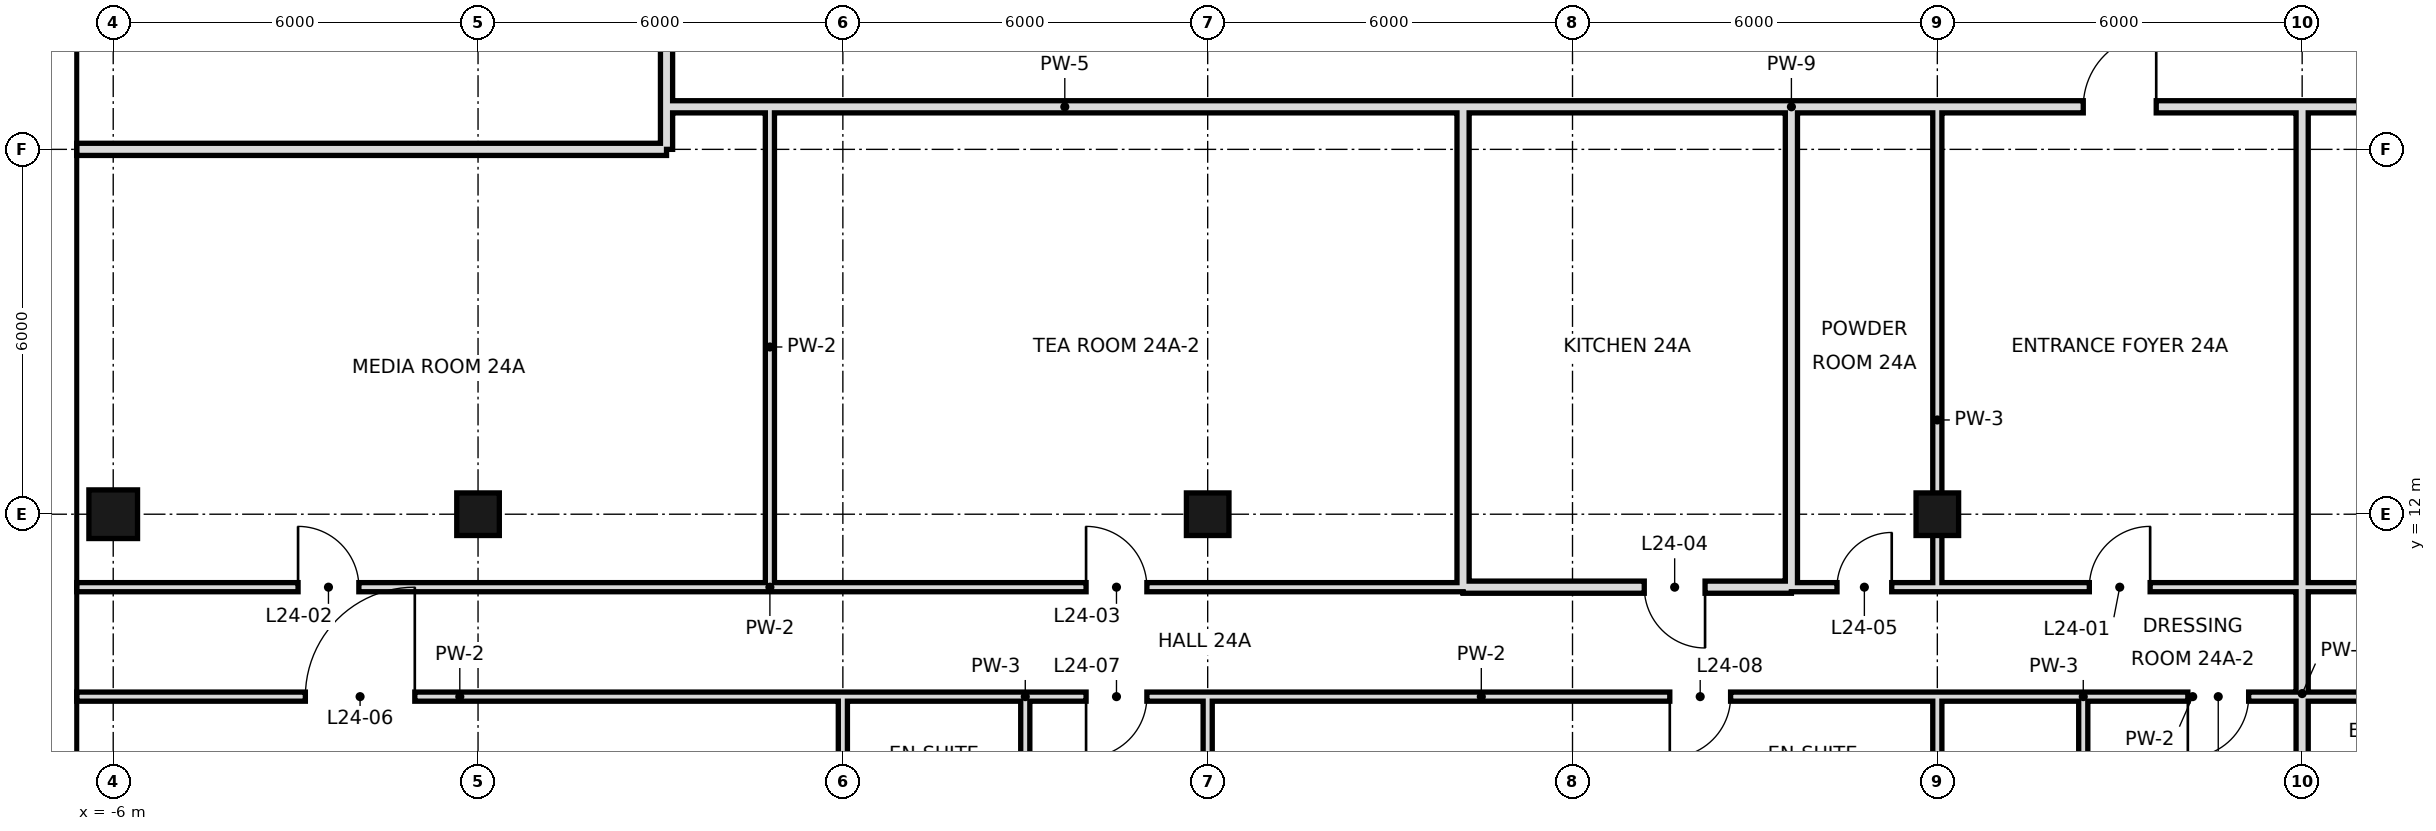
"""IFC4 building model, lengths in metres.
Left out: names, types, materials, properties, quantities, classifications, styles, units other than length and angle.
Written with IfcOpenShell. Run it as: python <this file> out.ifc"""

import sys

from ifc_helpers import new_model, si_unit, direction, frame, frame_2d, origin, origin_2d, place, context, subcontext, project, spatial, rectangle, hollow_rectangle, extrude, element, fill, save


model = new_model("IFC4")
c1 = context("Model", 3, precision=1e-05, world=origin(), true_north=direction((0.0, 1.0)))
c2 = subcontext(c1, "Body", "Model", "MODEL_VIEW")
j1 = project(units=[si_unit("LENGTHUNIT", "METRE"), si_unit("PLANEANGLEUNIT", "RADIAN")], contexts=[c1])
p1 = place(None, origin())
s1 = spatial("IfcSite", under=j1, at=p1, CompositionType="ELEMENT")
p2 = place(p1, origin())
s2 = spatial("IfcBuilding", under=s1, at=p2, CompositionType="ELEMENT")
p3 = place(p2, frame((0.0, 0.0, 110.6)))
s3 = spatial("IfcBuildingStorey", under=s2, at=p3, CompositionType="ELEMENT", Elevation=110.6)
p4 = place(p3, frame((-6.0, 12.0, 0.0), z_axis=(0.0, 0.0, 1.0), x_axis=(1.0, 0.0, 0.0)))
e1 = element("IfcColumn", 1, at=p4, inside=s3, PredefinedType="COLUMN", context=c2, shape_type="SweptSolid", body=[
    extrude(hollow_rectangle(XDim=0.8, YDim=0.8, WallThickness=0.04, at=origin_2d()), origin(), (0.0, 0.0, 1.0), 3.6),
])
for number, where, z_axis, x_axis in (
    (2, (0.0, 12.0, 0.0), (0.0, 0.0, 1.0), (1.0, 0.0, 0.0)),
    (3, (12.0, 12.0, 0.0), (0.0, 0.0, 1.0), (1.0, 0.0, 0.0)),
    (4, (24.0, 12.0, 0.0), (0.0, 0.0, 1.0), (1.0, 0.0, 0.0)),
):
    element("IfcColumn", number, at=place(p3, frame(where, z_axis=z_axis, x_axis=x_axis)), inside=s3, PredefinedType="COLUMN", context=c2, shape_type="SweptSolid", body=[
        extrude(hollow_rectangle(XDim=0.7, YDim=0.7, WallThickness=0.036, at=origin_2d()), origin(), (0.0, 0.0, 1.0), 3.6),
    ])
p5 = place(p3, frame((12.0, 0.0, 0.0), z_axis=(0.0, 0.0, 1.0), x_axis=(0.0, 1.0, 0.0)))
e5 = element("IfcWall", 5, at=p5, inside=s3, PredefinedType="PARTITIONING", context=c2, shape_type="SweptSolid", body=[
    extrude(rectangle(XDim=9.0, YDim=0.15, at=frame_2d((4.5, 0.0))), origin(), (0.0, 0.0, 1.0), 2.68),
])
for number, where, z_axis, x_axis in (
    (6, (16.2, 10.8, 0.0), (0.0, 0.0, 1.0), (0.0, 1.0, 0.0)),
    (7, (21.6, 10.8, 0.0), (0.0, 0.0, 1.0), (0.0, 1.0, 0.0)),
):
    element("IfcWall", number, at=place(p3, frame(where, z_axis=z_axis, x_axis=x_axis)), inside=s3, PredefinedType="SOLIDWALL", context=c2, shape_type="SweptSolid", body=[
        extrude(rectangle(XDim=7.9, YDim=0.2, at=frame_2d((3.95, 0.0))), origin(), (0.0, 0.0, 1.0), 2.68),
    ])
p6 = place(p3, frame((24.0, 6.0, 0.0), z_axis=(0.0, 0.0, 1.0), x_axis=(0.0, 1.0, 0.0)))
e8 = element("IfcWall", 8, at=p6, inside=s3, PredefinedType="PARTITIONING", context=c2, shape_type="SweptSolid", body=[
    extrude(rectangle(XDim=3.0, YDim=0.15, at=frame_2d((1.5, 0.0))), origin(), (0.0, 0.0, 1.0), 2.68),
])
p7 = place(p3, frame((24.0, 10.8, 0.0), z_axis=(0.0, 0.0, 1.0), x_axis=(0.0, 1.0, 0.0)))
e9 = element("IfcWall", 9, at=p7, inside=s3, PredefinedType="PARTITIONING", context=c2, shape_type="SweptSolid", body=[
    extrude(rectangle(XDim=7.9, YDim=0.15, at=frame_2d((3.95, 0.0))), origin(), (0.0, 0.0, 1.0), 2.68),
])
p8 = place(p3, frame((26.4, 6.0, 0.0), z_axis=(0.0, 0.0, 1.0), x_axis=(0.0, 1.0, 0.0)))
e10 = element("IfcWall", 10, at=p8, inside=s3, PredefinedType="PARTITIONING", context=c2, shape_type="SweptSolid", body=[
    extrude(rectangle(XDim=3.0, YDim=0.15, at=frame_2d((1.5, 0.0))), origin(), (0.0, 0.0, 1.0), 3.38),
])
p9 = place(p3, frame((3.1, 18.0, 0.0), z_axis=(0.0, 0.0, 1.0), x_axis=(0.0, 1.0, 0.0)))
e11 = element("IfcWall", 11, at=p9, inside=s3, PredefinedType="SOLIDWALL", context=c2, shape_type="SweptSolid", body=[
    extrude(rectangle(XDim=30.6, YDim=0.2, at=frame_2d((15.3, 0.0))), origin(), (0.0, 0.0, 1.0), 2.68),
])
p10 = place(p9, frame((9.23, 0.0, 0.0)))
e12 = element("IfcOpeningElement", 12, at=p10, cuts=e11, PredefinedType="OPENING", context=c2, shape_type="SweptSolid", body=[
    extrude(rectangle(XDim=1.2, YDim=2.4, at=frame_2d((0.6, 1.2))), frame((0.0, 0.11, 0.0), z_axis=(0.0, -1.0, 0.0), x_axis=(1.0, 0.0, 0.0)), (0.0, 0.0, 1.0), 0.22),
])
p11 = place(p3, frame((30.0, -0.6, 0.0), z_axis=(0.0, 0.0, 1.0), x_axis=(0.0, 1.0, 0.0)))
e13 = element("IfcWall", 13, at=p11, inside=s3, PredefinedType="SOLIDWALL", context=c2, shape_type="SweptSolid", body=[
    extrude(rectangle(XDim=19.3, YDim=0.2, at=frame_2d((9.65, 0.0))), origin(), (0.0, 0.0, 1.0), 2.68),
])
p12 = place(p3, frame((4.8, 10.8, 0.0), z_axis=(0.0, 0.0, 1.0), x_axis=(0.0, 1.0, 0.0)))
e14 = element("IfcWall", 14, at=p12, inside=s3, PredefinedType="PARTITIONING", context=c2, shape_type="SweptSolid", body=[
    extrude(rectangle(XDim=7.9, YDim=0.15, at=frame_2d((3.95, 0.0))), origin(), (0.0, 0.0, 1.0), 3.38),
])
p13 = place(p3, frame((6.0, 6.0, 0.0), z_axis=(0.0, 0.0, 1.0), x_axis=(0.0, 1.0, 0.0)))
e15 = element("IfcWall", 15, at=p13, inside=s3, PredefinedType="PARTITIONING", context=c2, shape_type="SweptSolid", body=[
    extrude(rectangle(XDim=3.0, YDim=0.15, at=frame_2d((1.5, 0.0))), origin(), (0.0, 0.0, 1.0), 2.68),
])
p14 = place(p3, frame((9.0, 6.0, 0.0), z_axis=(0.0, 0.0, 1.0), x_axis=(0.0, 1.0, 0.0)))
e16 = element("IfcWall", 16, at=p14, inside=s3, PredefinedType="PARTITIONING", context=c2, shape_type="SweptSolid", body=[
    extrude(rectangle(XDim=3.0, YDim=0.15, at=frame_2d((1.5, 0.0))), origin(), (0.0, 0.0, 1.0), 3.38),
])
p15 = place(p3, frame((16.2, 10.8, 0.0), z_axis=(0.0, 0.0, 1.0), x_axis=(1.0, 0.0, 0.0)))
e17 = element("IfcWall", 17, at=p15, inside=s3, PredefinedType="SOLIDWALL", context=c2, shape_type="SweptSolid", body=[
    extrude(rectangle(XDim=5.4, YDim=0.2, at=frame_2d((2.7, 0.0))), origin(), (0.0, 0.0, 1.0), 2.68),
])
p16 = place(p15, frame((2.98, 0.0, 0.0)))
e18 = element("IfcOpeningElement", 18, at=p16, cuts=e17, PredefinedType="OPENING", context=c2, shape_type="SweptSolid", body=[
    extrude(rectangle(XDim=1.0, YDim=2.4, at=frame_2d((0.5, 1.2))), frame((0.0, 0.11, 0.0), z_axis=(0.0, -1.0, 0.0), x_axis=(1.0, 0.0, 0.0)), (0.0, 0.0, 1.0), 0.22),
])
p17 = place(p3, frame((-6.6, 10.8, 0.0), z_axis=(0.0, 0.0, 1.0), x_axis=(1.0, 0.0, 0.0)))
e19 = element("IfcWall", 19, at=p17, inside=s3, PredefinedType="PARTITIONING", context=c2, shape_type="SweptSolid", body=[
    extrude(rectangle(XDim=22.8, YDim=0.15, at=frame_2d((11.4, 0.0))), origin(), (0.0, 0.0, 1.0), 3.38),
])
p18 = place(p17, frame((3.64, 0.0, 0.0)))
e20 = element("IfcOpeningElement", 20, at=p18, cuts=e19, PredefinedType="OPENING", context=c2, shape_type="SweptSolid", body=[
    extrude(rectangle(XDim=1.0, YDim=2.4, at=frame_2d((0.5, 1.2))), frame((0.0, 0.085, 0.0), z_axis=(0.0, -1.0, 0.0), x_axis=(1.0, 0.0, 0.0)), (0.0, 0.0, 1.0), 0.17),
])
p19 = place(p17, frame((16.6, 0.0, 0.0)))
e21 = element("IfcOpeningElement", 21, at=p19, cuts=e19, PredefinedType="OPENING", context=c2, shape_type="SweptSolid", body=[
    extrude(rectangle(XDim=1.0, YDim=2.4, at=frame_2d((0.5, 1.2))), frame((0.0, 0.085, 0.0), z_axis=(0.0, -1.0, 0.0), x_axis=(1.0, 0.0, 0.0)), (0.0, 0.0, 1.0), 0.17),
])
p20 = place(p3, frame((24.0, 10.8, 0.0), z_axis=(0.0, 0.0, 1.0), x_axis=(1.0, 0.0, 0.0)))
e22 = element("IfcWall", 22, at=p20, inside=s3, PredefinedType="PARTITIONING", context=c2, shape_type="SweptSolid", body=[
    extrude(rectangle(XDim=18.0, YDim=0.15, at=frame_2d((9.0, 0.0))), origin(), (0.0, 0.0, 1.0), 3.38),
])
p21 = place(p20, frame((2.5, 0.0, 0.0)))
e23 = element("IfcOpeningElement", 23, at=p21, cuts=e22, PredefinedType="OPENING", context=c2, shape_type="SweptSolid", body=[
    extrude(rectangle(XDim=1.0, YDim=2.4, at=frame_2d((0.5, 1.2))), frame((0.0, 0.085, 0.0), z_axis=(0.0, -1.0, 0.0), x_axis=(1.0, 0.0, 0.0)), (0.0, 0.0, 1.0), 0.17),
])
p22 = place(p20, frame((15.4, 0.0, 0.0)))
e24 = element("IfcOpeningElement", 24, at=p22, cuts=e22, PredefinedType="OPENING", context=c2, shape_type="SweptSolid", body=[
    extrude(rectangle(XDim=1.0, YDim=2.4, at=frame_2d((0.5, 1.2))), frame((0.0, 0.085, 0.0), z_axis=(0.0, -1.0, 0.0), x_axis=(1.0, 0.0, 0.0)), (0.0, 0.0, 1.0), 0.17),
])
p23 = place(p20, frame((8.55, 0.0, 0.0)))
e25 = element("IfcOpeningElement", 25, at=p23, cuts=e22, PredefinedType="OPENING", context=c2, shape_type="SweptSolid", body=[
    extrude(rectangle(XDim=0.9, YDim=2.1, at=frame_2d((0.45, 1.05))), frame((0.0, 0.085, 0.0), z_axis=(0.0, -1.0, 0.0), x_axis=(1.0, 0.0, 0.0)), (0.0, 0.0, 1.0), 0.17),
])
p24 = place(p3, frame((21.6, 10.8, 0.0), z_axis=(0.0, 0.0, 1.0), x_axis=(1.0, 0.0, 0.0)))
e26 = element("IfcWall", 26, at=p24, inside=s3, PredefinedType="PARTITIONING", context=c2, shape_type="SweptSolid", body=[
    extrude(rectangle(XDim=2.4, YDim=0.15, at=frame_2d((1.2, 0.0))), origin(), (0.0, 0.0, 1.0), 3.38),
])
p25 = place(p24, frame((0.75, 0.0, 0.0)))
e27 = element("IfcOpeningElement", 27, at=p25, cuts=e26, PredefinedType="OPENING", context=c2, shape_type="SweptSolid", body=[
    extrude(rectangle(XDim=0.9, YDim=2.4, at=frame_2d((0.45, 1.2))), frame((0.0, 0.085, 0.0), z_axis=(0.0, -1.0, 0.0), x_axis=(1.0, 0.0, 0.0)), (0.0, 0.0, 1.0), 0.17),
])
p26 = place(p3, frame((-6.6, 18.0, 0.0), z_axis=(0.0, 0.0, 1.0), x_axis=(1.0, 0.0, 0.0)))
e28 = element("IfcWall", 28, at=p26, inside=s3, PredefinedType="SOLIDWALL", context=c2, shape_type="SweptSolid", body=[
    extrude(rectangle(XDim=9.7, YDim=0.2, at=frame_2d((4.85, 0.0))), origin(), (0.0, 0.0, 1.0), 2.68),
])
p27 = place(p3, frame((3.1, 18.7, 0.0), z_axis=(0.0, 0.0, 1.0), x_axis=(1.0, 0.0, 0.0)))
e29 = element("IfcWall", 29, at=p27, inside=s3, PredefinedType="SOLIDWALL", context=c2, shape_type="SweptSolid", body=[
    extrude(rectangle(XDim=13.1, YDim=0.2, at=frame_2d((6.55, 0.0))), origin(), (0.0, 0.0, 1.0), 2.68),
])
p28 = place(p3, frame((21.6, 18.7, 0.0), z_axis=(0.0, 0.0, 1.0), x_axis=(1.0, 0.0, 0.0)))
e30 = element("IfcWall", 30, at=p28, inside=s3, PredefinedType="SOLIDWALL", context=c2, shape_type="SweptSolid", body=[
    extrude(rectangle(XDim=22.8, YDim=0.2, at=frame_2d((11.4, 0.0))), origin(), (0.0, 0.0, 1.0), 2.68),
])
p29 = place(p28, frame((4.8, 0.0, 0.0)))
e31 = element("IfcOpeningElement", 31, at=p29, cuts=e30, PredefinedType="OPENING", context=c2, shape_type="SweptSolid", body=[
    extrude(rectangle(XDim=1.2, YDim=2.4, at=frame_2d((0.6, 1.2))), frame((0.0, 0.11, 0.0), z_axis=(0.0, -1.0, 0.0), x_axis=(1.0, 0.0, 0.0)), (0.0, 0.0, 1.0), 0.22),
])
p30 = place(p28, frame((16.8, 0.0, 0.0)))
e32 = element("IfcOpeningElement", 32, at=p30, cuts=e30, PredefinedType="OPENING", context=c2, shape_type="SweptSolid", body=[
    extrude(rectangle(XDim=1.2, YDim=2.4, at=frame_2d((0.6, 1.2))), frame((0.0, 0.11, 0.0), z_axis=(0.0, -1.0, 0.0), x_axis=(1.0, 0.0, 0.0)), (0.0, 0.0, 1.0), 0.22),
])
p31 = place(p3, frame((16.2, 18.7, 0.0), z_axis=(0.0, 0.0, 1.0), x_axis=(1.0, 0.0, 0.0)))
e33 = element("IfcWall", 33, at=p31, inside=s3, PredefinedType="SOLIDWALL", context=c2, shape_type="SweptSolid", body=[
    extrude(rectangle(XDim=5.4, YDim=0.2, at=frame_2d((2.7, 0.0))), origin(), (0.0, 0.0, 1.0), 2.68),
])
p32 = place(p3, frame((-6.6, 9.0, 0.0), z_axis=(0.0, 0.0, 1.0), x_axis=(1.0, 0.0, 0.0)))
e34 = element("IfcWall", 34, at=p32, inside=s3, PredefinedType="PARTITIONING", context=c2, shape_type="SweptSolid", body=[
    extrude(rectangle(XDim=12.6, YDim=0.15, at=frame_2d((6.3, 0.0))), origin(), (0.0, 0.0, 1.0), 3.38),
])
p33 = place(p32, frame((3.76, 0.0, 0.0)))
e35 = element("IfcOpeningElement", 35, at=p33, cuts=e34, PredefinedType="OPENING", context=c2, shape_type="SweptSolid", body=[
    extrude(rectangle(XDim=1.8, YDim=2.4, at=frame_2d((0.9, 1.2))), frame((0.0, 0.085, 0.0), z_axis=(0.0, -1.0, 0.0), x_axis=(1.0, 0.0, 0.0)), (0.0, 0.0, 1.0), 0.17),
])
p34 = place(p3, frame((9.0, 9.0, 0.0), z_axis=(0.0, 0.0, 1.0), x_axis=(1.0, 0.0, 0.0)))
e36 = element("IfcWall", 36, at=p34, inside=s3, PredefinedType="PARTITIONING", context=c2, shape_type="SweptSolid", body=[
    extrude(rectangle(XDim=15.0, YDim=0.15, at=frame_2d((7.5, 0.0))), origin(), (0.0, 0.0, 1.0), 3.38),
])
p35 = place(p34, frame((1.0, 0.0, 0.0)))
e37 = element("IfcOpeningElement", 37, at=p35, cuts=e36, PredefinedType="OPENING", context=c2, shape_type="SweptSolid", body=[
    extrude(rectangle(XDim=1.0, YDim=2.4, at=frame_2d((0.5, 1.2))), frame((0.0, 0.085, 0.0), z_axis=(0.0, -1.0, 0.0), x_axis=(1.0, 0.0, 0.0)), (0.0, 0.0, 1.0), 0.17),
])
p36 = place(p34, frame((10.6, 0.0, 0.0)))
e38 = element("IfcOpeningElement", 38, at=p36, cuts=e36, PredefinedType="OPENING", context=c2, shape_type="SweptSolid", body=[
    extrude(rectangle(XDim=1.0, YDim=2.4, at=frame_2d((0.5, 1.2))), frame((0.0, 0.085, 0.0), z_axis=(0.0, -1.0, 0.0), x_axis=(1.0, 0.0, 0.0)), (0.0, 0.0, 1.0), 0.17),
])
p37 = place(p3, frame((26.4, 9.0, 0.0), z_axis=(0.0, 0.0, 1.0), x_axis=(1.0, 0.0, 0.0)))
e39 = element("IfcWall", 39, at=p37, inside=s3, PredefinedType="PARTITIONING", context=c2, shape_type="SweptSolid", body=[
    extrude(rectangle(XDim=3.6, YDim=0.15, at=frame_2d((1.8, 0.0))), origin(), (0.0, 0.0, 1.0), 3.38),
])
p38 = place(p37, frame((1.72, 0.0, 0.0)))
e40 = element("IfcOpeningElement", 40, at=p38, cuts=e39, PredefinedType="OPENING", context=c2, shape_type="SweptSolid", body=[
    extrude(rectangle(XDim=1.0, YDim=2.4, at=frame_2d((0.5, 1.2))), frame((0.0, 0.085, 0.0), z_axis=(0.0, -1.0, 0.0), x_axis=(1.0, 0.0, 0.0)), (0.0, 0.0, 1.0), 0.17),
])
p39 = place(p3, frame((6.0, 9.0, 0.0), z_axis=(0.0, 0.0, 1.0), x_axis=(1.0, 0.0, 0.0)))
e41 = element("IfcWall", 41, at=p39, inside=s3, PredefinedType="PARTITIONING", context=c2, shape_type="SweptSolid", body=[
    extrude(rectangle(XDim=3.0, YDim=0.15, at=frame_2d((1.5, 0.0))), origin(), (0.0, 0.0, 1.0), 3.38),
])
p40 = place(p3, frame((24.0, 9.0, 0.0), z_axis=(0.0, 0.0, 1.0), x_axis=(1.0, 0.0, 0.0)))
e42 = element("IfcWall", 42, at=p40, inside=s3, PredefinedType="PARTITIONING", context=c2, shape_type="SweptSolid", body=[
    extrude(rectangle(XDim=2.4, YDim=0.15, at=frame_2d((1.2, 0.0))), origin(), (0.0, 0.0, 1.0), 3.38),
])
p41 = place(p3, frame((30.0, 9.0, 0.0), z_axis=(0.0, 0.0, 1.0), x_axis=(1.0, 0.0, 0.0)))
e43 = element("IfcWall", 43, at=p41, inside=s3, PredefinedType="PARTITIONING", context=c2, shape_type="SweptSolid", body=[
    extrude(rectangle(XDim=3.0, YDim=0.15, at=frame_2d((1.5, 0.0))), origin(), (0.0, 0.0, 1.0), 3.38),
])
p42 = place(p21, frame((1.0, 0.0, 0.0), z_axis=(0.0, 0.0, 1.0), x_axis=(-1.0, 0.0, 0.0)))
e44 = element("IfcDoor", 44, at=p42, inside=s3, OperationType="SINGLE_SWING_LEFT", PredefinedType="DOOR", context=c2, shape_type="SweptSolid", body=[
    extrude(rectangle(XDim=1.0, YDim=2.4, at=frame_2d((0.5, 1.2))), frame((0.0, 0.025, 0.0), z_axis=(0.0, -1.0, 0.0), x_axis=(1.0, 0.0, 0.0)), (0.0, 0.0, 1.0), 0.05),
])
fill(e23, e44)
p43 = place(p18, origin())
e45 = element("IfcDoor", 45, at=p43, inside=s3, OperationType="SINGLE_SWING_LEFT", PredefinedType="DOOR", context=c2, shape_type="SweptSolid", body=[
    extrude(rectangle(XDim=1.0, YDim=2.4, at=frame_2d((0.5, 1.2))), frame((0.0, 0.025, 0.0), z_axis=(0.0, -1.0, 0.0), x_axis=(1.0, 0.0, 0.0)), (0.0, 0.0, 1.0), 0.05),
])
fill(e20, e45)
p44 = place(p19, origin())
e46 = element("IfcDoor", 46, at=p44, inside=s3, OperationType="SINGLE_SWING_LEFT", PredefinedType="DOOR", context=c2, shape_type="SweptSolid", body=[
    extrude(rectangle(XDim=1.0, YDim=2.4, at=frame_2d((0.5, 1.2))), frame((0.0, 0.025, 0.0), z_axis=(0.0, -1.0, 0.0), x_axis=(1.0, 0.0, 0.0)), (0.0, 0.0, 1.0), 0.05),
])
fill(e21, e46)
p45 = place(p16, origin())
e47 = element("IfcDoor", 47, at=p45, inside=s3, OperationType="SINGLE_SWING_RIGHT", PredefinedType="DOOR", context=c2, shape_type="SweptSolid", body=[
    extrude(rectangle(XDim=1.0, YDim=2.4, at=frame_2d((0.5, 1.2))), frame((0.0, 0.025, 0.0), z_axis=(0.0, -1.0, 0.0), x_axis=(1.0, 0.0, 0.0)), (0.0, 0.0, 1.0), 0.05),
])
fill(e18, e47)
p46 = place(p25, frame((0.9, 0.0, 0.0), z_axis=(0.0, 0.0, 1.0), x_axis=(-1.0, 0.0, 0.0)))
e48 = element("IfcDoor", 48, at=p46, inside=s3, OperationType="SINGLE_SWING_LEFT", PredefinedType="DOOR", context=c2, shape_type="SweptSolid", body=[
    extrude(rectangle(XDim=0.9, YDim=2.4, at=frame_2d((0.45, 1.2))), frame((0.0, 0.025, 0.0), z_axis=(0.0, -1.0, 0.0), x_axis=(1.0, 0.0, 0.0)), (0.0, 0.0, 1.0), 0.05),
])
fill(e27, e48)
p47 = place(p33, frame((1.8, 0.0, 0.0), z_axis=(0.0, 0.0, 1.0), x_axis=(-1.0, 0.0, 0.0)))
e49 = element("IfcDoor", 49, at=p47, inside=s3, OperationType="SINGLE_SWING_LEFT", PredefinedType="DOOR", context=c2, shape_type="SweptSolid", body=[
    extrude(rectangle(XDim=1.8, YDim=2.4, at=frame_2d((0.9, 1.2))), frame((0.0, 0.025, 0.0), z_axis=(0.0, -1.0, 0.0), x_axis=(1.0, 0.0, 0.0)), (0.0, 0.0, 1.0), 0.05),
])
fill(e35, e49)
p48 = place(p35, frame((1.0, 0.0, 0.0), z_axis=(0.0, 0.0, 1.0), x_axis=(-1.0, 0.0, 0.0)))
e50 = element("IfcDoor", 50, at=p48, inside=s3, OperationType="SINGLE_SWING_RIGHT", PredefinedType="DOOR", context=c2, shape_type="SweptSolid", body=[
    extrude(rectangle(XDim=1.0, YDim=2.4, at=frame_2d((0.5, 1.2))), frame((0.0, 0.025, 0.0), z_axis=(0.0, -1.0, 0.0), x_axis=(1.0, 0.0, 0.0)), (0.0, 0.0, 1.0), 0.05),
])
fill(e37, e50)
p49 = place(p36, frame((1.0, 0.0, 0.0), z_axis=(0.0, 0.0, 1.0), x_axis=(-1.0, 0.0, 0.0)))
e51 = element("IfcDoor", 51, at=p49, inside=s3, OperationType="SINGLE_SWING_RIGHT", PredefinedType="DOOR", context=c2, shape_type="SweptSolid", body=[
    extrude(rectangle(XDim=1.0, YDim=2.4, at=frame_2d((0.5, 1.2))), frame((0.0, 0.025, 0.0), z_axis=(0.0, -1.0, 0.0), x_axis=(1.0, 0.0, 0.0)), (0.0, 0.0, 1.0), 0.05),
])
fill(e38, e51)
p50 = place(p38, frame((1.0, 0.0, 0.0), z_axis=(0.0, 0.0, 1.0), x_axis=(-1.0, 0.0, 0.0)))
e52 = element("IfcDoor", 52, at=p50, inside=s3, OperationType="SINGLE_SWING_RIGHT", PredefinedType="DOOR", context=c2, shape_type="SweptSolid", body=[
    extrude(rectangle(XDim=1.0, YDim=2.4, at=frame_2d((0.5, 1.2))), frame((0.0, 0.025, 0.0), z_axis=(0.0, -1.0, 0.0), x_axis=(1.0, 0.0, 0.0)), (0.0, 0.0, 1.0), 0.05),
])
fill(e40, e52)
p51 = place(p29, frame((1.2, 0.0, 0.0), z_axis=(0.0, 0.0, 1.0), x_axis=(-1.0, 0.0, 0.0)))
e53 = element("IfcDoor", 53, at=p51, inside=s3, OperationType="SINGLE_SWING_LEFT", PredefinedType="DOOR", context=c2, shape_type="SweptSolid", body=[
    extrude(rectangle(XDim=1.2, YDim=2.4, at=frame_2d((0.6, 1.2))), frame((0.0, 0.025, 0.0), z_axis=(0.0, -1.0, 0.0), x_axis=(1.0, 0.0, 0.0)), (0.0, 0.0, 1.0), 0.05),
])
fill(e31, e53)
save(model, sys.argv[1])
